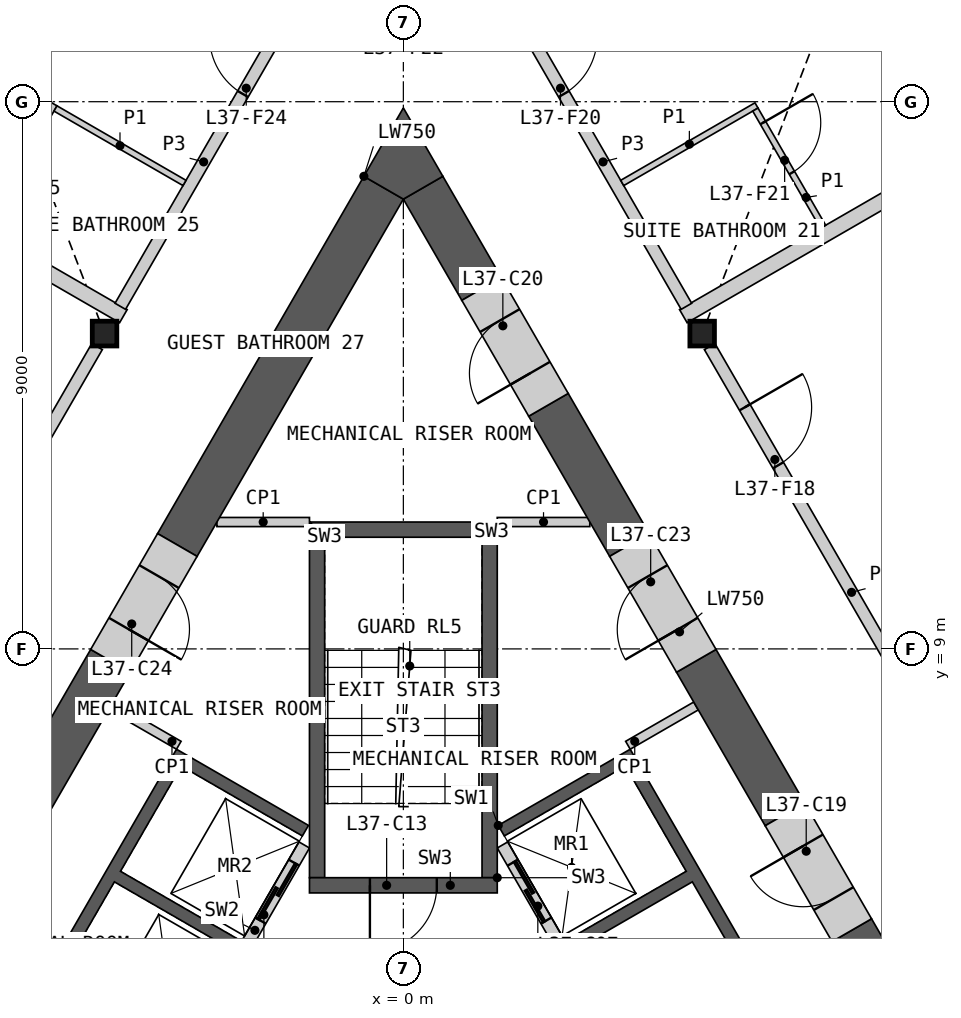
"""IFC4 building model, lengths in metres.
Left out: names, types, materials, properties, quantities, classifications, styles, units other than length and angle.
Written with IfcOpenShell. Run it as: python <this file> out.ifc"""

import sys

from ifc_helpers import new_model, si_unit, direction, frame, frame_2d, origin, origin_2d, place, context, subcontext, project, spatial, polyline, rectangle, i_section, outline, extrude, element, fill, save


model = new_model("IFC4")
c1 = context("Model", 3, precision=1e-05, world=origin(), true_north=direction((0.0, 1.0)))
c2 = subcontext(c1, "Body", "Model", "MODEL_VIEW")
j1 = project(units=[si_unit("LENGTHUNIT", "METRE"), si_unit("PLANEANGLEUNIT", "RADIAN")], contexts=[c1])
p1 = place(None, origin())
s1 = spatial("IfcSite", under=j1, at=p1, CompositionType="ELEMENT")
p2 = place(p1, origin())
s2 = spatial("IfcBuilding", under=s1, at=p2, CompositionType="ELEMENT")
p3 = place(p2, frame((0.0, 0.0, 176.4)))
s3 = spatial("IfcBuildingStorey", under=s2, at=p3, CompositionType="ELEMENT", Elevation=176.4)
for number, where, z_axis, x_axis in (
    (1, (-4.914, 14.186, 0.0), (0.0, 0.0, 1.0), (1.0, 0.0, 0.0)),
    (2, (4.914, 14.186, 0.0), (0.0, 0.0, 1.0), (1.0, 0.0, 0.0)),
):
    element("IfcColumn", number, at=place(p3, frame(where, z_axis=z_axis, x_axis=x_axis)), inside=s3, PredefinedType="COLUMN", context=c2, shape_type="SweptSolid", body=[
        extrude(i_section(OverallWidth=0.404, OverallDepth=0.407, WebThickness=0.027, FlangeThickness=0.044, at=origin_2d()), origin(), (0.0, 0.0, 1.0), 3.6),
    ])
p4 = place(p3, origin())
e3 = element("IfcWall", 3, at=p4, inside=s3, PredefinedType="SHEAR", context=c2, shape_type="SweptSolid", body=[
    extrude(outline(polyline([(1.561, 6.097), (3.731, 7.35), (7.131, 1.461), (4.96, 0.208), (4.861, 0.381), (6.852, 1.531), (4.752, 5.169), (2.76, 4.019), (2.66, 4.192), (4.652, 5.342), (3.652, 7.074), (1.66, 5.924), (1.561, 6.097)])), origin(), (0.0, 0.0, 1.0), 3.25),
])
p5 = place(p3, frame((5.817, -1.476, 0.0), z_axis=(0.0, 0.0, 1.0), x_axis=(-0.500002616675, 0.866023893041, 0.0)))
e4 = element("IfcWall", 4, at=p5, inside=s3, PredefinedType="SOLIDWALL", context=c2, shape_type="SweptSolid", body=[
    extrude(rectangle(XDim=8.373, YDim=0.2, at=frame_2d((4.187, 0.0))), origin(), (0.0, 0.0, 1.0), 3.25),
])
p6 = place(p5, frame((0.437, 0.0, 0.0)))
e5 = element("IfcOpeningElement", 5, at=p6, cuts=e4, PredefinedType="OPENING", context=c2, shape_type="SweptSolid", body=[
    extrude(rectangle(XDim=0.9, YDim=2.1, at=frame_2d((0.45, 1.05))), frame((0.0, 0.11, 0.0), z_axis=(0.0, -1.0, 0.0), x_axis=(1.0, 0.0, 0.0)), (0.0, 0.0, 1.0), 0.22),
])
p7 = place(p5, frame((3.737, 0.0, 0.0)))
e6 = element("IfcOpeningElement", 6, at=p7, cuts=e4, PredefinedType="OPENING", context=c2, shape_type="SweptSolid", body=[
    extrude(rectangle(XDim=0.9, YDim=2.1, at=frame_2d((0.45, 1.05))), frame((0.0, 0.11, 0.0), z_axis=(0.0, -1.0, 0.0), x_axis=(1.0, 0.0, 0.0)), (0.0, 0.0, 1.0), 0.22),
])
p8 = place(p5, frame((6.937, 0.0, 0.0)))
e7 = element("IfcOpeningElement", 7, at=p8, cuts=e4, PredefinedType="OPENING", context=c2, shape_type="SweptSolid", body=[
    extrude(rectangle(XDim=1.1, YDim=2.1, at=frame_2d((0.55, 1.05))), frame((0.0, 0.11, 0.0), z_axis=(0.0, -1.0, 0.0), x_axis=(1.0, 0.0, 0.0)), (0.0, 0.0, 1.0), 0.22),
])
p9 = place(p3, origin())
e8 = element("IfcWall", 8, at=p9, inside=s3, PredefinedType="SHEAR", context=c2, shape_type="SweptSolid", body=[
    extrude(outline(polyline([(-4.96, 0.208), (-7.131, 1.461), (-3.731, 7.35), (-1.561, 6.097), (-1.66, 5.924), (-3.652, 7.074), (-4.652, 5.342), (-2.66, 4.192), (-2.76, 4.019), (-4.752, 5.169), (-5.752, 3.437), (-3.76, 2.287), (-3.861, 2.113), (-5.852, 3.263), (-6.852, 1.531), (-4.861, 0.381), (-4.96, 0.208)])), origin(), (0.0, 0.0, 1.0), 3.25),
])
p10 = place(p3, frame((-1.631, 5.776, 0.0), z_axis=(0.0, 0.0, 1.0), x_axis=(-0.499992876559, -0.866029516466, 0.0)))
e9 = element("IfcWall", 9, at=p10, inside=s3, PredefinedType="SOLIDWALL", context=c2, shape_type="SweptSolid", body=[
    extrude(rectangle(XDim=6.486, YDim=0.2, at=frame_2d((3.243, 0.0))), origin(), (0.0, 0.0, 1.0), 3.25),
])
p11 = place(p10, frame((0.337, 0.0, 0.0)))
e10 = element("IfcOpeningElement", 10, at=p11, cuts=e9, PredefinedType="OPENING", context=c2, shape_type="SweptSolid", body=[
    extrude(rectangle(XDim=1.1, YDim=2.1, at=frame_2d((0.55, 1.05))), frame((0.0, 0.11, 0.0), z_axis=(0.0, -1.0, 0.0), x_axis=(1.0, 0.0, 0.0)), (0.0, 0.0, 1.0), 0.22),
])
p12 = place(p10, frame((2.537, 0.0, 0.0)))
e11 = element("IfcOpeningElement", 11, at=p12, cuts=e9, PredefinedType="OPENING", context=c2, shape_type="SweptSolid", body=[
    extrude(rectangle(XDim=1.1, YDim=2.1, at=frame_2d((0.55, 1.05))), frame((0.0, 0.11, 0.0), z_axis=(0.0, -1.0, 0.0), x_axis=(1.0, 0.0, 0.0)), (0.0, 0.0, 1.0), 0.22),
])
p13 = place(p3, origin())
e12 = element("IfcWall", 12, at=p13, inside=s3, PredefinedType="SHEAR", context=c2, shape_type="SweptSolid", body=[
    extrude(outline(polyline([(1.544, 5.237), (1.544, 11.087), (1.294, 10.837), (1.294, 5.237), (1.544, 5.237)])), origin(), (0.0, 0.0, 1.0), 3.25),
])
p14 = place(p3, origin())
e13 = element("IfcWall", 13, at=p14, inside=s3, PredefinedType="SHEAR", context=c2, shape_type="SweptSolid", body=[
    extrude(outline(polyline([(1.544, 11.087), (-1.544, 11.087), (-1.294, 10.837), (1.294, 10.837), (1.544, 11.087)])), origin(), (0.0, 0.0, 1.0), 3.25),
])
p15 = place(p3, origin())
e14 = element("IfcWall", 14, at=p15, inside=s3, PredefinedType="SHEAR", context=c2, shape_type="SweptSolid", body=[
    extrude(outline(polyline([(-1.294, 10.837), (-1.544, 11.087), (-1.544, 5.237), (-1.294, 5.237), (-1.294, 10.837)])), origin(), (0.0, 0.0, 1.0), 3.25),
])
p16 = place(p3, frame((1.544, 5.112, 0.0), z_axis=(0.0, 0.0, 1.0), x_axis=(-1.0, 0.0, 0.0)))
e15 = element("IfcWall", 15, at=p16, inside=s3, PredefinedType="SHEAR", context=c2, shape_type="SweptSolid", body=[
    extrude(rectangle(XDim=3.088, YDim=0.25, at=frame_2d((1.544, 0.0))), origin(), (0.0, 0.0, 1.0), 3.25),
])
p17 = place(p16, frame((0.994, 0.0, 0.0)))
e16 = element("IfcOpeningElement", 16, at=p17, cuts=e15, PredefinedType="OPENING", context=c2, shape_type="SweptSolid", body=[
    extrude(rectangle(XDim=1.1, YDim=2.1, at=frame_2d((0.55, 1.05))), frame((0.0, 0.135, 0.0), z_axis=(0.0, -1.0, 0.0), x_axis=(1.0, 0.0, 0.0)), (0.0, 0.0, 1.0), 0.27),
])
for number, where, z_axis, x_axis in (
    (17, (3.693, 7.415, 0.0), (0.0, 0.0, 1.0), (0.866, 0.5, 0.0)),
    (18, (-3.693, 7.415, 0.0), (0.0, 0.0, 1.0), (-0.866, 0.5, 0.0)),
):
    element("IfcWall", number, at=place(p3, frame(where, z_axis=z_axis, x_axis=x_axis)), inside=s3, PredefinedType="PARTITIONING", context=c2, shape_type="SweptSolid", body=[
        extrude(rectangle(XDim=1.293, YDim=0.15, at=frame_2d((0.646, 0.0))), origin(), (0.0, 0.0, 1.0), 3.25),
    ])
for number, where, z_axis, x_axis in (
    (19, (1.544, 11.087, 0.0), (0.0, 0.0, 1.0), (1.0, 0.0, 0.0)),
    (20, (-1.544, 11.087, 0.0), (0.0, 0.0, 1.0), (-1.0, 0.0, 0.0)),
):
    element("IfcWall", number, at=place(p3, frame(where, z_axis=z_axis, x_axis=x_axis)), inside=s3, PredefinedType="PARTITIONING", context=c2, shape_type="SweptSolid", body=[
        extrude(rectangle(XDim=1.522, YDim=0.15, at=frame_2d((0.761, 0.0))), origin(), (0.0, 0.0, 1.0), 3.25),
    ])
p18 = place(p3, frame((14.526, -8.011, 0.0), z_axis=(0.0, 0.0, 1.0), x_axis=(-0.499994855372, 0.866028374016, 0.0)))
e21 = element("IfcWall", 21, at=p18, inside=s3, PredefinedType="SHEAR", context=c2, shape_type="SweptSolid", body=[
    extrude(rectangle(XDim=14.301, YDim=0.75, at=frame_2d((7.15, 0.0))), origin(), (0.0, 0.0, 1.0), 3.25),
])
p19 = place(p3, frame((6.275, 6.279, 0.0), z_axis=(0.0, 0.0, 1.0), x_axis=(-0.500029273391, 0.866008502124, 0.0)))
e22 = element("IfcWall", 22, at=p19, inside=s3, PredefinedType="SHEAR", context=c2, shape_type="SweptSolid", body=[
    extrude(rectangle(XDim=2.916, YDim=0.75, at=frame_2d((1.458, 0.0))), origin(), (0.0, 0.0, 1.0), 3.25),
])
p20 = place(p3, frame((3.717, 10.709, 0.0), z_axis=(0.0, 0.0, 1.0), x_axis=(-0.500005599468, 0.866022170906, 0.0)))
e23 = element("IfcWall", 23, at=p20, inside=s3, PredefinedType="SHEAR", context=c2, shape_type="SweptSolid", body=[
    extrude(rectangle(XDim=2.662, YDim=0.75, at=frame_2d((1.331, 0.0))), origin(), (0.0, 0.0, 1.0), 3.25),
])
p21 = place(p3, frame((1.286, 14.92, 0.0), z_axis=(0.0, 0.0, 1.0), x_axis=(-0.500030129425, 0.866008007854, 0.0)))
e24 = element("IfcWall", 24, at=p21, inside=s3, PredefinedType="SHEAR", context=c2, shape_type="SweptSolid", body=[
    extrude(rectangle(XDim=1.923, YDim=0.75, at=frame_2d((0.962, 0.0))), origin(), (0.0, 0.0, 1.0), 3.25),
])
p22 = place(p3, frame((-0.325, 16.585, 0.0), z_axis=(0.0, 0.0, 1.0), x_axis=(-0.499993425452, -0.866029199568, 0.0)))
e25 = element("IfcWall", 25, at=p22, inside=s3, PredefinedType="SHEAR", context=c2, shape_type="SweptSolid", body=[
    extrude(rectangle(XDim=6.785, YDim=0.75, at=frame_2d((3.393, 0.0))), origin(), (0.0, 0.0, 1.0), 3.25),
])
p23 = place(p3, frame((-4.817, 8.804, 0.0), z_axis=(0.0, 0.0, 1.0), x_axis=(-0.500029273391, -0.866008502124, 0.0)))
e26 = element("IfcWall", 26, at=p23, inside=s3, PredefinedType="SHEAR", context=c2, shape_type="SweptSolid", body=[
    extrude(rectangle(XDim=2.916, YDim=0.75, at=frame_2d((1.458, 0.0))), origin(), (0.0, 0.0, 1.0), 3.25),
])
p24 = place(p3, origin())
e27 = element("IfcWall", 27, at=p24, inside=s3, PredefinedType="SHEAR", context=c2, shape_type="SweptSolid", body=[
    extrude(outline(polyline([(-0.649, 16.773), (0.0, 17.898), (0.649, 16.773), (0.0, 16.398), (-0.649, 16.773)])), origin(), (0.0, 0.0, 1.0), 3.25),
])
p25 = place(p3, frame((7.375, 4.374, 0.0), z_axis=(0.0, 0.0, 1.0), x_axis=(-0.499946605688, 0.86605622881, 0.0)))
e28 = element("IfcWall", 28, at=p25, inside=s3, PredefinedType="SHEAR", context=c2, shape_type="SweptSolid", body=[
    extrude(rectangle(XDim=2.2, YDim=0.75, at=frame_2d((1.1, 0.0))), origin(), (0.0, 0.0, 1.0), 3.25),
])
p26 = place(p25, frame((0.6, 0.0, 0.0)))
e29 = element("IfcOpeningElement", 29, at=p26, cuts=e28, PredefinedType="OPENING", context=c2, shape_type="SweptSolid", body=[
    extrude(rectangle(XDim=1.0, YDim=2.1, at=frame_2d((0.5, 1.05))), frame((0.0, 0.385, 0.0), z_axis=(0.0, -1.0, 0.0), x_axis=(1.0, 0.0, 0.0)), (0.0, 0.0, 1.0), 0.77),
])
p27 = place(p3, frame((2.386, 13.015, 0.0), z_axis=(0.0, 0.0, 1.0), x_axis=(-0.499946605688, 0.86605622881, 0.0)))
e30 = element("IfcWall", 30, at=p27, inside=s3, PredefinedType="SHEAR", context=c2, shape_type="SweptSolid", body=[
    extrude(rectangle(XDim=2.2, YDim=0.75, at=frame_2d((1.1, 0.0))), origin(), (0.0, 0.0, 1.0), 3.25),
])
p28 = place(p27, frame((0.6, 0.0, 0.0)))
e31 = element("IfcOpeningElement", 31, at=p28, cuts=e30, PredefinedType="OPENING", context=c2, shape_type="SweptSolid", body=[
    extrude(rectangle(XDim=1.0, YDim=2.1, at=frame_2d((0.5, 1.05))), frame((0.0, 0.385, 0.0), z_axis=(0.0, -1.0, 0.0), x_axis=(1.0, 0.0, 0.0)), (0.0, 0.0, 1.0), 0.77),
])
p29 = place(p3, frame((4.817, 8.804, 0.0), z_axis=(0.0, 0.0, 1.0), x_axis=(-0.50002983664, 0.866008176907, 0.0)))
e32 = element("IfcWall", 32, at=p29, inside=s3, PredefinedType="SHEAR", context=c2, shape_type="SweptSolid", body=[
    extrude(rectangle(XDim=2.2, YDim=0.75, at=frame_2d((1.1, 0.0))), origin(), (0.0, 0.0, 1.0), 3.25),
])
p30 = place(p29, frame((0.6, 0.0, 0.0)))
e33 = element("IfcOpeningElement", 33, at=p30, cuts=e32, PredefinedType="OPENING", context=c2, shape_type="SweptSolid", body=[
    extrude(rectangle(XDim=1.0, YDim=2.1, at=frame_2d((0.5, 1.05))), frame((0.0, 0.385, 0.0), z_axis=(0.0, -1.0, 0.0), x_axis=(1.0, 0.0, 0.0)), (0.0, 0.0, 1.0), 0.77),
])
p31 = place(p3, frame((-3.717, 10.709, 0.0), z_axis=(0.0, 0.0, 1.0), x_axis=(-0.50002983664, -0.866008176907, 0.0)))
e34 = element("IfcWall", 34, at=p31, inside=s3, PredefinedType="SHEAR", context=c2, shape_type="SweptSolid", body=[
    extrude(rectangle(XDim=2.2, YDim=0.75, at=frame_2d((1.1, 0.0))), origin(), (0.0, 0.0, 1.0), 3.25),
])
p32 = place(p31, frame((0.6, 0.0, 0.0)))
e35 = element("IfcOpeningElement", 35, at=p32, cuts=e34, PredefinedType="OPENING", context=c2, shape_type="SweptSolid", body=[
    extrude(rectangle(XDim=1.0, YDim=2.1, at=frame_2d((0.5, 1.05))), frame((0.0, 0.385, 0.0), z_axis=(0.0, -1.0, 0.0), x_axis=(1.0, 0.0, 0.0)), (0.0, 0.0, 1.0), 0.77),
])
for number, where, z_axis, x_axis in (
    (36, (4.604, 14.473, 0.0), (0.0, 0.0, 1.0), (0.866, 0.5, 0.0)),
    (37, (-15.835, 20.956, 0.0), (0.0, 0.0, 1.0), (0.866, -0.5, 0.0)),
):
    element("IfcWall", number, at=place(p3, frame(where, z_axis=z_axis, x_axis=x_axis)), inside=s3, PredefinedType="PARTITIONING", context=c2, shape_type="SweptSolid", body=[
        extrude(rectangle(XDim=12.968, YDim=0.25, at=frame_2d((6.484, 0.0))), origin(), (0.0, 0.0, 1.0), 2.404),
    ])
p33 = place(p3, frame((5.038, 13.972, 0.0), z_axis=(0.0, 0.0, 1.0), x_axis=(0.50000393355, -0.866023132736, 0.0)))
e38 = element("IfcWall", 38, at=p33, inside=s3, PredefinedType="PARTITIONING", context=c2, shape_type="SweptSolid", body=[
    extrude(rectangle(XDim=9.335, YDim=0.2, at=frame_2d((4.667, 0.0))), origin(), (0.0, 0.0, 1.0), 3.25),
])
p34 = place(p33, frame((1.154, 0.0, 0.0)))
e39 = element("IfcOpeningElement", 39, at=p34, cuts=e38, PredefinedType="OPENING", context=c2, shape_type="SweptSolid", body=[
    extrude(rectangle(XDim=1.1, YDim=2.1, at=frame_2d((0.55, 1.05))), frame((0.0, 0.11, 0.0), z_axis=(0.0, -1.0, 0.0), x_axis=(1.0, 0.0, 0.0)), (0.0, 0.0, 1.0), 0.22),
])
p35 = place(p3, frame((-9.705, 5.888, 0.0), z_axis=(0.0, 0.0, 1.0), x_axis=(0.50000393355, 0.866023132736, 0.0)))
e40 = element("IfcWall", 40, at=p35, inside=s3, PredefinedType="PARTITIONING", context=c2, shape_type="SweptSolid", body=[
    extrude(rectangle(XDim=9.335, YDim=0.2, at=frame_2d((4.667, 0.0))), origin(), (0.0, 0.0, 1.0), 3.25),
])
p36 = place(p35, frame((5.172, 0.0, 0.0)))
e41 = element("IfcOpeningElement", 41, at=p36, cuts=e40, PredefinedType="OPENING", context=c2, shape_type="SweptSolid", body=[
    extrude(rectangle(XDim=1.0, YDim=2.1, at=frame_2d((0.5, 1.05))), frame((0.0, 0.11, 0.0), z_axis=(0.0, -1.0, 0.0), x_axis=(1.0, 0.0, 0.0)), (0.0, 0.0, 1.0), 0.22),
])
p37 = place(p35, frame((1.556, 0.0, 0.0)))
e42 = element("IfcOpeningElement", 42, at=p37, cuts=e40, PredefinedType="OPENING", context=c2, shape_type="SweptSolid", body=[
    extrude(rectangle(XDim=1.8, YDim=2.1, at=frame_2d((0.9, 1.05))), frame((0.0, 0.11, 0.0), z_axis=(0.0, -1.0, 0.0), x_axis=(1.0, 0.0, 0.0)), (0.0, 0.0, 1.0), 0.22),
])
p38 = place(p3, frame((1.913, 19.385, 0.0), z_axis=(0.0, 0.0, 1.0), x_axis=(0.499988331988, -0.866032140209, 0.0)))
e43 = element("IfcWall", 43, at=p38, inside=s3, PredefinedType="PARTITIONING", context=c2, shape_type="SweptSolid", body=[
    extrude(rectangle(XDim=5.485, YDim=0.2, at=frame_2d((2.742, 0.0))), origin(), (0.0, 0.0, 1.0), 3.25),
])
p39 = place(p38, frame((0.352, 0.0, 0.0)))
e44 = element("IfcOpeningElement", 44, at=p39, cuts=e43, PredefinedType="OPENING", context=c2, shape_type="SweptSolid", body=[
    extrude(rectangle(XDim=1.1, YDim=2.1, at=frame_2d((0.55, 1.05))), frame((0.0, 0.11, 0.0), z_axis=(0.0, -1.0, 0.0), x_axis=(1.0, 0.0, 0.0)), (0.0, 0.0, 1.0), 0.22),
])
p40 = place(p3, frame((-4.655, 14.635, 0.0), z_axis=(0.0, 0.0, 1.0), x_axis=(0.499988331988, 0.866032140209, 0.0)))
e45 = element("IfcWall", 45, at=p40, inside=s3, PredefinedType="PARTITIONING", context=c2, shape_type="SweptSolid", body=[
    extrude(rectangle(XDim=5.485, YDim=0.2, at=frame_2d((2.742, 0.0))), origin(), (0.0, 0.0, 1.0), 3.25),
])
p41 = place(p40, frame((4.032, 0.0, 0.0)))
e46 = element("IfcOpeningElement", 46, at=p41, cuts=e45, PredefinedType="OPENING", context=c2, shape_type="SweptSolid", body=[
    extrude(rectangle(XDim=1.1, YDim=2.1, at=frame_2d((0.55, 1.05))), frame((0.0, 0.11, 0.0), z_axis=(0.0, -1.0, 0.0), x_axis=(1.0, 0.0, 0.0)), (0.0, 0.0, 1.0), 0.22),
])
p42 = place(p3, frame((-8.339, 13.454, 0.0), z_axis=(0.0, 0.0, 1.0), x_axis=(0.499992051641, 0.866029992723, 0.0)))
e47 = element("IfcWall", 47, at=p42, inside=s3, PredefinedType="PARTITIONING", context=c2, shape_type="SweptSolid", body=[
    extrude(rectangle(XDim=5.2, YDim=0.1, at=frame_2d((2.6, 0.0))), origin(), (0.0, 0.0, 1.0), 2.404),
])
p43 = place(p42, frame((4.0, 0.0, 0.0)))
e48 = element("IfcOpeningElement", 48, at=p43, cuts=e47, PredefinedType="OPENING", context=c2, shape_type="SweptSolid", body=[
    extrude(rectangle(XDim=0.95, YDim=2.1, at=frame_2d((0.475, 1.05))), frame((0.0, 0.06, 0.0), z_axis=(0.0, -1.0, 0.0), x_axis=(1.0, 0.0, 0.0)), (0.0, 0.0, 1.0), 0.12),
])
p44 = place(p42, frame((0.25, 0.0, 0.0)))
e49 = element("IfcOpeningElement", 49, at=p44, cuts=e47, PredefinedType="OPENING", context=c2, shape_type="SweptSolid", body=[
    extrude(rectangle(XDim=0.95, YDim=2.1, at=frame_2d((0.475, 1.05))), frame((0.0, 0.06, 0.0), z_axis=(0.0, -1.0, 0.0), x_axis=(1.0, 0.0, 0.0)), (0.0, 0.0, 1.0), 0.12),
])
p45 = place(p3, frame((3.599, 16.664, 0.0), z_axis=(0.0, 0.0, 1.0), x_axis=(0.865989465428, 0.500062241894, 0.0)))
e50 = element("IfcWall", 50, at=p45, inside=s3, PredefinedType="PARTITIONING", context=c2, shape_type="SweptSolid", body=[
    extrude(rectangle(XDim=2.55, YDim=0.1, at=frame_2d((1.275, 0.0))), origin(), (0.0, 0.0, 1.0), 2.404),
])
p46 = place(p3, frame((-5.721, 17.889, 0.0), z_axis=(0.0, 0.0, 1.0), x_axis=(0.866014668023, -0.500018594424, 0.0)))
e51 = element("IfcWall", 51, at=p46, inside=s3, PredefinedType="PARTITIONING", context=c2, shape_type="SweptSolid", body=[
    extrude(rectangle(XDim=2.45, YDim=0.1, at=frame_2d((1.225, 0.0))), origin(), (0.0, 0.0, 1.0), 2.404),
])
p47 = place(p3, frame((5.789, 17.87, 0.0), z_axis=(0.0, 0.0, 1.0), x_axis=(0.49999788721, -0.866026623601, 0.0)))
e52 = element("IfcWall", 52, at=p47, inside=s3, PredefinedType="PARTITIONING", context=c2, shape_type="SweptSolid", body=[
    extrude(rectangle(XDim=2.225, YDim=0.1, at=frame_2d((1.113, 0.0))), origin(), (0.0, 0.0, 1.0), 2.404),
])
p48 = place(p47, frame((0.25, 0.0, 0.0)))
e53 = element("IfcOpeningElement", 53, at=p48, cuts=e52, PredefinedType="OPENING", context=c2, shape_type="SweptSolid", body=[
    extrude(rectangle(XDim=0.95, YDim=2.1, at=frame_2d((0.475, 1.05))), frame((0.0, 0.06, 0.0), z_axis=(0.0, -1.0, 0.0), x_axis=(1.0, 0.0, 0.0)), (0.0, 0.0, 1.0), 0.12),
])
p49 = place(p8, origin())
e54 = element("IfcDoor", 54, at=p49, inside=s3, OperationType="SLIDING_TO_LEFT", PredefinedType="DOOR", context=c2, shape_type="SweptSolid", body=[
    extrude(rectangle(XDim=1.1, YDim=2.1, at=frame_2d((0.55, 1.05))), frame((0.0, 0.025, 0.0), z_axis=(0.0, -1.0, 0.0), x_axis=(1.0, 0.0, 0.0)), (0.0, 0.0, 1.0), 0.05),
])
fill(e7, e54)
p50 = place(p11, origin())
e55 = element("IfcDoor", 55, at=p50, inside=s3, OperationType="SLIDING_TO_LEFT", PredefinedType="DOOR", context=c2, shape_type="SweptSolid", body=[
    extrude(rectangle(XDim=1.1, YDim=2.1, at=frame_2d((0.55, 1.05))), frame((0.0, 0.025, 0.0), z_axis=(0.0, -1.0, 0.0), x_axis=(1.0, 0.0, 0.0)), (0.0, 0.0, 1.0), 0.05),
])
fill(e10, e55)
p51 = place(p17, origin())
e56 = element("IfcDoor", 56, at=p51, inside=s3, OperationType="SINGLE_SWING_RIGHT", PredefinedType="DOOR", context=c2, shape_type="SweptSolid", body=[
    extrude(rectangle(XDim=1.1, YDim=2.1, at=frame_2d((0.55, 1.05))), frame((0.0, 0.025, 0.0), z_axis=(0.0, -1.0, 0.0), x_axis=(1.0, 0.0, 0.0)), (0.0, 0.0, 1.0), 0.05),
])
fill(e16, e56)
p52 = place(p26, origin())
e57 = element("IfcDoor", 57, at=p52, inside=s3, OperationType="SINGLE_SWING_RIGHT", PredefinedType="DOOR", context=c2, shape_type="SweptSolid", body=[
    extrude(rectangle(XDim=1.0, YDim=2.1, at=frame_2d((0.5, 1.05))), frame((0.0, 0.13, 0.0), z_axis=(0.0, -1.0, 0.0), x_axis=(1.0, 0.0, 0.0)), (0.0, 0.0, 1.0), 0.05),
])
fill(e29, e57)
p53 = place(p28, origin())
e58 = element("IfcDoor", 58, at=p53, inside=s3, OperationType="SINGLE_SWING_LEFT", PredefinedType="DOOR", context=c2, shape_type="SweptSolid", body=[
    extrude(rectangle(XDim=1.0, YDim=2.1, at=frame_2d((0.5, 1.05))), frame((0.0, 0.13, 0.0), z_axis=(0.0, -1.0, 0.0), x_axis=(1.0, 0.0, 0.0)), (0.0, 0.0, 1.0), 0.05),
])
fill(e31, e58)
p54 = place(p30, origin())
e59 = element("IfcDoor", 59, at=p54, inside=s3, OperationType="SINGLE_SWING_LEFT", PredefinedType="DOOR", context=c2, shape_type="SweptSolid", body=[
    extrude(rectangle(XDim=1.0, YDim=2.1, at=frame_2d((0.5, 1.05))), frame((0.0, 0.13, 0.0), z_axis=(0.0, -1.0, 0.0), x_axis=(1.0, 0.0, 0.0)), (0.0, 0.0, 1.0), 0.05),
])
fill(e33, e59)
p55 = place(p32, origin())
e60 = element("IfcDoor", 60, at=p55, inside=s3, OperationType="SINGLE_SWING_RIGHT", PredefinedType="DOOR", context=c2, shape_type="SweptSolid", body=[
    extrude(rectangle(XDim=1.0, YDim=2.1, at=frame_2d((0.5, 1.05))), frame((0.0, 0.13, 0.0), z_axis=(0.0, -1.0, 0.0), x_axis=(1.0, 0.0, 0.0)), (0.0, 0.0, 1.0), 0.05),
])
fill(e35, e60)
p56 = place(p34, origin())
e61 = element("IfcDoor", 61, at=p56, inside=s3, OperationType="SINGLE_SWING_LEFT", PredefinedType="DOOR", context=c2, shape_type="SweptSolid", body=[
    extrude(rectangle(XDim=1.1, YDim=2.1, at=frame_2d((0.55, 1.05))), frame((0.0, 0.025, 0.0), z_axis=(0.0, -1.0, 0.0), x_axis=(1.0, 0.0, 0.0)), (0.0, 0.0, 1.0), 0.05),
])
fill(e39, e61)
p57 = place(p39, origin())
e62 = element("IfcDoor", 62, at=p57, inside=s3, OperationType="SINGLE_SWING_LEFT", PredefinedType="DOOR", context=c2, shape_type="SweptSolid", body=[
    extrude(rectangle(XDim=1.1, YDim=2.1, at=frame_2d((0.55, 1.05))), frame((0.0, 0.025, 0.0), z_axis=(0.0, -1.0, 0.0), x_axis=(1.0, 0.0, 0.0)), (0.0, 0.0, 1.0), 0.05),
])
fill(e44, e62)
p58 = place(p48, origin())
e63 = element("IfcDoor", 63, at=p58, inside=s3, OperationType="SINGLE_SWING_LEFT", PredefinedType="DOOR", context=c2, shape_type="SweptSolid", body=[
    extrude(rectangle(XDim=0.95, YDim=2.1, at=frame_2d((0.475, 1.05))), frame((0.0, 0.025, 0.0), z_axis=(0.0, -1.0, 0.0), x_axis=(1.0, 0.0, 0.0)), (0.0, 0.0, 1.0), 0.05),
])
fill(e53, e63)
p59 = place(p41, origin())
e64 = element("IfcDoor", 64, at=p59, inside=s3, OperationType="SINGLE_SWING_RIGHT", PredefinedType="DOOR", context=c2, shape_type="SweptSolid", body=[
    extrude(rectangle(XDim=1.1, YDim=2.1, at=frame_2d((0.55, 1.05))), frame((0.0, 0.025, 0.0), z_axis=(0.0, -1.0, 0.0), x_axis=(1.0, 0.0, 0.0)), (0.0, 0.0, 1.0), 0.05),
])
fill(e46, e64)
save(model, sys.argv[1])
